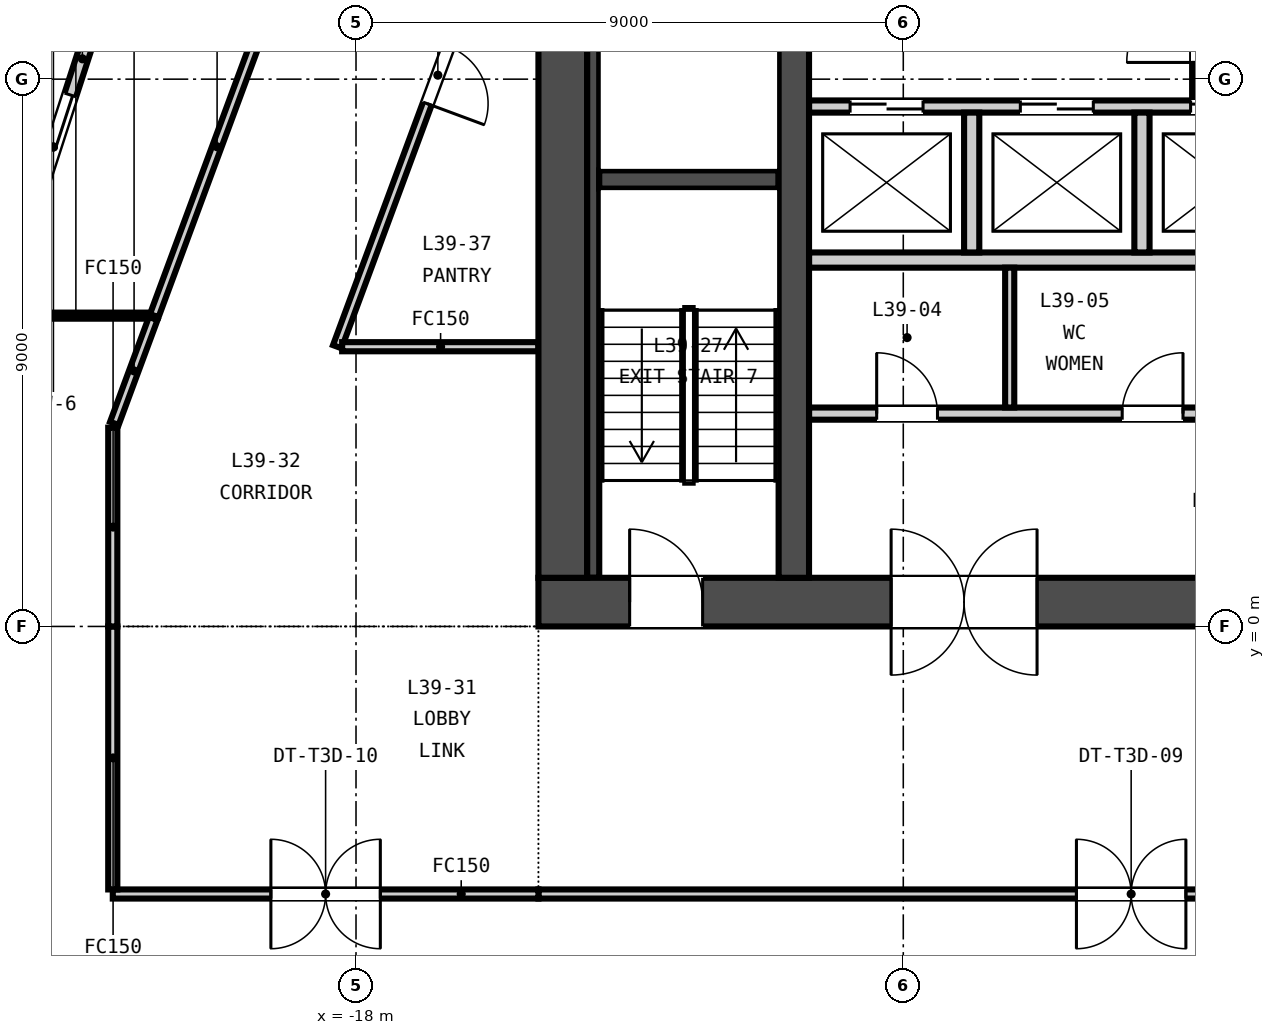
"""IFC4 building model, lengths in metres.
Left out: names, types, materials, properties, quantities, classifications, styles, units other than length and angle.
Written with IfcOpenShell. Run it as: python <this file> out.ifc"""

import sys

from ifc_helpers import new_model, si_unit, direction, frame, frame_2d, origin, place, context, subcontext, project, spatial, rectangle, extrude, element, fill, save


model = new_model("IFC4")
c1 = context("Model", 3, precision=1e-05, world=origin(), true_north=direction((0.0, 1.0)))
c2 = subcontext(c1, "Body", "Model", "MODEL_VIEW")
j1 = project(units=[si_unit("LENGTHUNIT", "METRE"), si_unit("PLANEANGLEUNIT", "RADIAN")], contexts=[c1])
p1 = place(None, origin())
s1 = spatial("IfcSite", under=j1, at=p1, CompositionType="ELEMENT")
p2 = place(p1, origin())
s2 = spatial("IfcBuilding", under=s1, at=p2, CompositionType="ELEMENT")
p3 = place(p2, frame((0.0, 0.0, 159.0)))
s3 = spatial("IfcBuildingStorey", under=s2, at=p3, CompositionType="ELEMENT", Elevation=159.0)
p4 = place(p3, frame((-15.0, 0.4, -0.15), z_axis=(0.0, 0.0, 1.0), x_axis=(1.0, 0.0, 0.0)))
e1 = element("IfcWall", 1, at=p4, inside=s3, PredefinedType="SOLIDWALL", context=c2, shape_type="SweptSolid", body=[
    extrude(rectangle(XDim=30.0, YDim=0.8, at=frame_2d((15.0, 0.0))), origin(), (0.0, 0.0, 1.0), 3.65),
])
p5 = place(p4, frame((5.8, 0.0, 0.15)))
e2 = element("IfcOpeningElement", 2, at=p5, cuts=e1, PredefinedType="OPENING", context=c2, shape_type="SweptSolid", body=[
    extrude(rectangle(XDim=2.4, YDim=2.4, at=frame_2d((1.2, 1.2))), frame((0.0, 0.41, 0.0), z_axis=(0.0, -1.0, 0.0), x_axis=(1.0, 0.0, 0.0)), (0.0, 0.0, 1.0), 0.82),
])
p6 = place(p4, frame((13.8, 0.0, 0.15)))
e3 = element("IfcOpeningElement", 3, at=p6, cuts=e1, PredefinedType="OPENING", context=c2, shape_type="SweptSolid", body=[
    extrude(rectangle(XDim=2.4, YDim=2.4, at=frame_2d((1.2, 1.2))), frame((0.0, 0.41, 0.0), z_axis=(0.0, -1.0, 0.0), x_axis=(1.0, 0.0, 0.0)), (0.0, 0.0, 1.0), 0.82),
])
p7 = place(p4, frame((21.8, 0.0, 0.15)))
e4 = element("IfcOpeningElement", 4, at=p7, cuts=e1, PredefinedType="OPENING", context=c2, shape_type="SweptSolid", body=[
    extrude(rectangle(XDim=2.4, YDim=2.4, at=frame_2d((1.2, 1.2))), frame((0.0, 0.41, 0.0), z_axis=(0.0, -1.0, 0.0), x_axis=(1.0, 0.0, 0.0)), (0.0, 0.0, 1.0), 0.82),
])
p8 = place(p4, frame((1.5, 0.0, 0.15)))
e5 = element("IfcOpeningElement", 5, at=p8, cuts=e1, PredefinedType="OPENING", context=c2, shape_type="SweptSolid", body=[
    extrude(rectangle(XDim=1.2, YDim=2.1, at=frame_2d((0.6, 1.05))), frame((0.0, 0.41, 0.0), z_axis=(0.0, -1.0, 0.0), x_axis=(1.0, 0.0, 0.0)), (0.0, 0.0, 1.0), 0.82),
])
p9 = place(p4, frame((27.3, 0.0, 0.15)))
e6 = element("IfcOpeningElement", 6, at=p9, cuts=e1, PredefinedType="OPENING", context=c2, shape_type="SweptSolid", body=[
    extrude(rectangle(XDim=1.2, YDim=2.1, at=frame_2d((0.6, 1.05))), frame((0.0, 0.41, 0.0), z_axis=(0.0, -1.0, 0.0), x_axis=(1.0, 0.0, 0.0)), (0.0, 0.0, 1.0), 0.82),
])
p10 = place(p3, frame((-14.6, 0.8, -0.15), z_axis=(0.0, 0.0, 1.0), x_axis=(0.0, 1.0, 0.0)))
e7 = element("IfcWall", 7, at=p10, inside=s3, PredefinedType="SOLIDWALL", context=c2, shape_type="SweptSolid", body=[
    extrude(rectangle(XDim=13.4, YDim=0.8, at=frame_2d((6.7, 0.0))), origin(), (0.0, 0.0, 1.0), 3.65),
])
p11 = place(p3, frame((-10.8, 0.8, -0.15), z_axis=(0.0, 0.0, 1.0), x_axis=(0.0, 1.0, 0.0)))
e8 = element("IfcWall", 8, at=p11, inside=s3, PredefinedType="SOLIDWALL", context=c2, shape_type="SweptSolid", body=[
    extrude(rectangle(XDim=13.4, YDim=0.5, at=frame_2d((6.7, 0.0))), origin(), (0.0, 0.0, 1.0), 3.65),
])
p12 = place(p3, frame((-22.327, 9.882, 0.0), z_axis=(0.0, 0.0, 1.0), x_axis=(-0.30901640812, -0.951056706781, 0.0)))
e9 = element("IfcWall", 9, at=p12, inside=s3, PredefinedType="SOLIDWALL", context=c2, shape_type="SweptSolid", body=[
    extrude(rectangle(XDim=4.2, YDim=0.2, at=frame_2d((2.1, 0.0))), origin(), (0.0, 0.0, 1.0), 2.821),
])
p13 = place(p12, frame((1.2, 0.0, 0.0)))
e10 = element("IfcOpeningElement", 10, at=p13, cuts=e9, PredefinedType="OPENING", context=c2, shape_type="SweptSolid", body=[
    extrude(rectangle(XDim=1.8, YDim=2.4, at=frame_2d((0.9, 1.2))), frame((0.0, 0.11, 0.0), z_axis=(0.0, -1.0, 0.0), x_axis=(1.0, 0.0, 0.0)), (0.0, 0.0, 1.0), 0.22),
])
p14 = place(p3, frame((-10.55, 3.5, 0.0), z_axis=(0.0, 0.0, 1.0), x_axis=(1.0, 0.0, 0.0)))
e11 = element("IfcWall", 11, at=p14, inside=s3, PredefinedType="PARTITIONING", context=c2, shape_type="SweptSolid", body=[
    extrude(rectangle(XDim=21.1, YDim=0.2, at=frame_2d((10.55, 0.0))), origin(), (0.0, 0.0, 1.0), 3.5),
])
p15 = place(p14, frame((1.113, 0.0, 0.0)))
e12 = element("IfcOpeningElement", 12, at=p15, cuts=e11, PredefinedType="OPENING", context=c2, shape_type="SweptSolid", body=[
    extrude(rectangle(XDim=1.0, YDim=2.1, at=frame_2d((0.5, 1.05))), frame((0.0, 0.11, 0.0), z_axis=(0.0, -1.0, 0.0), x_axis=(1.0, 0.0, 0.0)), (0.0, 0.0, 1.0), 0.22),
])
p16 = place(p14, frame((5.15, 0.0, 0.0)))
e13 = element("IfcOpeningElement", 13, at=p16, cuts=e11, PredefinedType="OPENING", context=c2, shape_type="SweptSolid", body=[
    extrude(rectangle(XDim=1.0, YDim=2.1, at=frame_2d((0.5, 1.05))), frame((0.0, 0.11, 0.0), z_axis=(0.0, -1.0, 0.0), x_axis=(1.0, 0.0, 0.0)), (0.0, 0.0, 1.0), 0.22),
])
p17 = place(p14, frame((9.85, 0.0, 0.0)))
e14 = element("IfcOpeningElement", 14, at=p17, cuts=e11, PredefinedType="OPENING", context=c2, shape_type="SweptSolid", body=[
    extrude(rectangle(XDim=1.0, YDim=2.1, at=frame_2d((0.5, 1.05))), frame((0.0, 0.11, 0.0), z_axis=(0.0, -1.0, 0.0), x_axis=(1.0, 0.0, 0.0)), (0.0, 0.0, 1.0), 0.22),
])
p18 = place(p14, frame((13.4, 0.0, 0.0)))
e15 = element("IfcOpeningElement", 15, at=p18, cuts=e11, PredefinedType="OPENING", context=c2, shape_type="SweptSolid", body=[
    extrude(rectangle(XDim=1.0, YDim=2.1, at=frame_2d((0.5, 1.05))), frame((0.0, 0.11, 0.0), z_axis=(0.0, -1.0, 0.0), x_axis=(1.0, 0.0, 0.0)), (0.0, 0.0, 1.0), 0.22),
])
p19 = place(p14, frame((16.762, 0.0, 0.0)))
e16 = element("IfcOpeningElement", 16, at=p19, cuts=e11, PredefinedType="OPENING", context=c2, shape_type="SweptSolid", body=[
    extrude(rectangle(XDim=1.0, YDim=2.1, at=frame_2d((0.5, 1.05))), frame((0.0, 0.11, 0.0), z_axis=(0.0, -1.0, 0.0), x_axis=(1.0, 0.0, 0.0)), (0.0, 0.0, 1.0), 0.22),
])
p20 = place(p14, frame((19.9, 0.0, 0.0)))
e17 = element("IfcOpeningElement", 17, at=p20, cuts=e11, PredefinedType="OPENING", context=c2, shape_type="SweptSolid", body=[
    extrude(rectangle(XDim=0.9, YDim=2.1, at=frame_2d((0.45, 1.05))), frame((0.0, 0.11, 0.0), z_axis=(0.0, -1.0, 0.0), x_axis=(1.0, 0.0, 0.0)), (0.0, 0.0, 1.0), 0.22),
])
p21 = place(p3, frame((-10.55, 6.025, 0.0), z_axis=(0.0, 0.0, 1.0), x_axis=(1.0, 0.0, 0.0)))
e18 = element("IfcWall", 18, at=p21, inside=s3, PredefinedType="PARTITIONING", context=c2, shape_type="SweptSolid", body=[
    extrude(rectangle(XDim=21.1, YDim=0.25, at=frame_2d((10.55, 0.0))), origin(), (0.0, 0.0, 1.0), 3.5),
])
p22 = place(p3, frame((-10.55, 8.55, 0.0), z_axis=(0.0, 0.0, 1.0), x_axis=(1.0, 0.0, 0.0)))
e19 = element("IfcWall", 19, at=p22, inside=s3, PredefinedType="PARTITIONING", context=c2, shape_type="SweptSolid", body=[
    extrude(rectangle(XDim=21.1, YDim=0.2, at=frame_2d((10.55, 0.0))), origin(), (0.0, 0.0, 1.0), 3.5),
])
p23 = place(p22, frame((0.675, 0.0, 0.0)))
e20 = element("IfcOpeningElement", 20, at=p23, cuts=e19, PredefinedType="OPENING", context=c2, shape_type="SweptSolid", body=[
    extrude(rectangle(XDim=1.2, YDim=2.1, at=frame_2d((0.6, 1.05))), frame((0.0, 0.11, 0.0), z_axis=(0.0, -1.0, 0.0), x_axis=(1.0, 0.0, 0.0)), (0.0, 0.0, 1.0), 0.22),
])
p24 = place(p22, frame((3.475, 0.0, 0.0)))
e21 = element("IfcOpeningElement", 21, at=p24, cuts=e19, PredefinedType="OPENING", context=c2, shape_type="SweptSolid", body=[
    extrude(rectangle(XDim=1.2, YDim=2.1, at=frame_2d((0.6, 1.05))), frame((0.0, 0.11, 0.0), z_axis=(0.0, -1.0, 0.0), x_axis=(1.0, 0.0, 0.0)), (0.0, 0.0, 1.0), 0.22),
])
p25 = place(p22, frame((6.275, 0.0, 0.0)))
e22 = element("IfcOpeningElement", 22, at=p25, cuts=e19, PredefinedType="OPENING", context=c2, shape_type="SweptSolid", body=[
    extrude(rectangle(XDim=1.2, YDim=2.1, at=frame_2d((0.6, 1.05))), frame((0.0, 0.11, 0.0), z_axis=(0.0, -1.0, 0.0), x_axis=(1.0, 0.0, 0.0)), (0.0, 0.0, 1.0), 0.22),
])
p26 = place(p22, frame((9.075, 0.0, 0.0)))
e23 = element("IfcOpeningElement", 23, at=p26, cuts=e19, PredefinedType="OPENING", context=c2, shape_type="SweptSolid", body=[
    extrude(rectangle(XDim=1.2, YDim=2.1, at=frame_2d((0.6, 1.05))), frame((0.0, 0.11, 0.0), z_axis=(0.0, -1.0, 0.0), x_axis=(1.0, 0.0, 0.0)), (0.0, 0.0, 1.0), 0.22),
])
p27 = place(p22, frame((11.875, 0.0, 0.0)))
e24 = element("IfcOpeningElement", 24, at=p27, cuts=e19, PredefinedType="OPENING", context=c2, shape_type="SweptSolid", body=[
    extrude(rectangle(XDim=1.2, YDim=2.1, at=frame_2d((0.6, 1.05))), frame((0.0, 0.11, 0.0), z_axis=(0.0, -1.0, 0.0), x_axis=(1.0, 0.0, 0.0)), (0.0, 0.0, 1.0), 0.22),
])
p28 = place(p22, frame((14.675, 0.0, 0.0)))
e25 = element("IfcOpeningElement", 25, at=p28, cuts=e19, PredefinedType="OPENING", context=c2, shape_type="SweptSolid", body=[
    extrude(rectangle(XDim=1.2, YDim=2.1, at=frame_2d((0.6, 1.05))), frame((0.0, 0.11, 0.0), z_axis=(0.0, -1.0, 0.0), x_axis=(1.0, 0.0, 0.0)), (0.0, 0.0, 1.0), 0.22),
])
p29 = place(p22, frame((17.475, 0.0, 0.0)))
e26 = element("IfcOpeningElement", 26, at=p29, cuts=e19, PredefinedType="OPENING", context=c2, shape_type="SweptSolid", body=[
    extrude(rectangle(XDim=1.2, YDim=2.1, at=frame_2d((0.6, 1.05))), frame((0.0, 0.11, 0.0), z_axis=(0.0, -1.0, 0.0), x_axis=(1.0, 0.0, 0.0)), (0.0, 0.0, 1.0), 0.22),
])
p30 = place(p22, frame((19.9, 0.0, 0.0)))
e27 = element("IfcOpeningElement", 27, at=p30, cuts=e19, PredefinedType="OPENING", context=c2, shape_type="SweptSolid", body=[
    extrude(rectangle(XDim=0.9, YDim=2.1, at=frame_2d((0.45, 1.05))), frame((0.0, 0.11, 0.0), z_axis=(0.0, -1.0, 0.0), x_axis=(1.0, 0.0, 0.0)), (0.0, 0.0, 1.0), 0.22),
])
p31 = place(p3, frame((-4.125, 8.65, 0.0), z_axis=(0.0, 0.0, 1.0), x_axis=(0.0, 1.0, 0.0)))
e28 = element("IfcWall", 28, at=p31, inside=s3, PredefinedType="PARTITIONING", context=c2, shape_type="SweptSolid", body=[
    extrude(rectangle(XDim=2.45, YDim=0.25, at=frame_2d((1.225, 0.0))), origin(), (0.0, 0.0, 1.0), 3.5),
])
p32 = place(p31, frame((0.625, 0.0, 0.0)))
e29 = element("IfcOpeningElement", 29, at=p32, cuts=e28, PredefinedType="OPENING", context=c2, shape_type="SweptSolid", body=[
    extrude(rectangle(XDim=1.2, YDim=2.1, at=frame_2d((0.6, 1.05))), frame((0.0, 0.135, 0.0), z_axis=(0.0, -1.0, 0.0), x_axis=(1.0, 0.0, 0.0)), (0.0, 0.0, 1.0), 0.27),
])
p33 = place(p3, frame((-7.25, 3.6, 0.0), z_axis=(0.0, 0.0, 1.0), x_axis=(0.0, 1.0, 0.0)))
e30 = element("IfcWall", 30, at=p33, inside=s3, PredefinedType="PARTITIONING", context=c2, shape_type="SweptSolid", body=[
    extrude(rectangle(XDim=2.3, YDim=0.15, at=frame_2d((1.15, 0.0))), origin(), (0.0, 0.0, 1.0), 3.5),
])
for number, where, z_axis, x_axis in (
    (31, (-7.875, 6.15, 0.0), (0.0, 0.0, 1.0), (0.0, 1.0, 0.0)),
    (32, (-5.075, 6.15, 0.0), (0.0, 0.0, 1.0), (0.0, 1.0, 0.0)),
):
    element("IfcWall", number, at=place(p3, frame(where, z_axis=z_axis, x_axis=x_axis)), inside=s3, PredefinedType="PARTITIONING", context=c2, shape_type="SweptSolid", body=[
        extrude(rectangle(XDim=2.3, YDim=0.25, at=frame_2d((1.15, 0.0))), origin(), (0.0, 0.0, 1.0), 3.5),
    ])
p34 = place(p3, frame((-14.0, 7.35, 0.0), z_axis=(0.0, 0.0, 1.0), x_axis=(1.0, 0.0, 0.0)))
e33 = element("IfcWall", 33, at=p34, inside=s3, PredefinedType="SOLIDWALL", context=c2, shape_type="SweptSolid", body=[
    extrude(rectangle(XDim=2.95, YDim=0.3, at=frame_2d((1.475, 0.0))), origin(), (0.0, 0.0, 1.0), 3.5),
])
p35 = place(p3, frame((-14.1, 0.8, 0.0), z_axis=(0.0, 0.0, 1.0), x_axis=(0.0, 1.0, 0.0)))
e34 = element("IfcWall", 34, at=p35, inside=s3, PredefinedType="SOLIDWALL", context=c2, shape_type="SweptSolid", body=[
    extrude(rectangle(XDim=13.4, YDim=0.2, at=frame_2d((6.7, 0.0))), origin(), (0.0, 0.0, 1.0), 3.5),
])
p36 = place(p3, frame((4.495, -4.4, 0.0), z_axis=(0.0, 0.0, 1.0), x_axis=(-1.0, 0.0, 0.0)))
e35 = element("IfcWall", 35, at=p36, inside=s3, PredefinedType="PARTITIONING", context=c2, shape_type="SweptSolid", body=[
    extrude(rectangle(XDim=19.495, YDim=0.15, at=frame_2d((9.748, 0.0))), origin(), (0.0, 0.0, 1.0), 2.741),
])
p37 = place(p36, frame((8.847, 0.0, 0.0)))
e36 = element("IfcOpeningElement", 36, at=p37, cuts=e35, PredefinedType="OPENING", context=c2, shape_type="SweptSolid", body=[
    extrude(rectangle(XDim=1.8, YDim=2.1, at=frame_2d((0.9, 1.05))), frame((0.0, 0.085, 0.0), z_axis=(0.0, -1.0, 0.0), x_axis=(1.0, 0.0, 0.0)), (0.0, 0.0, 1.0), 0.17),
])
p38 = place(p3, frame((-15.0, -4.4, 0.0), z_axis=(0.0, 0.0, 1.0), x_axis=(-1.0, 0.0, 0.0)))
e37 = element("IfcWall", 37, at=p38, inside=s3, PredefinedType="PARTITIONING", context=c2, shape_type="SweptSolid", body=[
    extrude(rectangle(XDim=7.0, YDim=0.15, at=frame_2d((3.5, 0.0))), origin(), (0.0, 0.0, 1.0), 2.741),
])
p39 = place(p38, frame((2.6, 0.0, 0.0)))
e38 = element("IfcOpeningElement", 38, at=p39, cuts=e37, PredefinedType="OPENING", context=c2, shape_type="SweptSolid", body=[
    extrude(rectangle(XDim=1.8, YDim=2.1, at=frame_2d((0.9, 1.05))), frame((0.0, 0.085, 0.0), z_axis=(0.0, -1.0, 0.0), x_axis=(1.0, 0.0, 0.0)), (0.0, 0.0, 1.0), 0.17),
])
p40 = place(p3, frame((-15.0, 13.531, 0.0), z_axis=(0.0, 0.0, 1.0), x_axis=(-0.347347751601, -0.937736391241, 0.0)))
e39 = element("IfcWall", 39, at=p40, inside=s3, PredefinedType="PARTITIONING", context=c2, shape_type="SweptSolid", body=[
    extrude(rectangle(XDim=9.524, YDim=0.15, at=frame_2d((4.762, 0.0))), origin(), (0.0, 0.0, 1.0), 2.741),
])
p41 = place(p40, frame((4.262, 0.0, 0.0)))
e40 = element("IfcOpeningElement", 40, at=p41, cuts=e39, PredefinedType="OPENING", context=c2, shape_type="SweptSolid", body=[
    extrude(rectangle(XDim=1.0, YDim=2.1, at=frame_2d((0.5, 1.05))), frame((0.0, 0.085, 0.0), z_axis=(0.0, -1.0, 0.0), x_axis=(1.0, 0.0, 0.0)), (0.0, 0.0, 1.0), 0.17),
])
p42 = place(p3, frame((-21.318, 5.111, 0.0), z_axis=(0.0, 0.0, 1.0), x_axis=(0.347346173898, 0.937736975638, 0.0)))
e41 = element("IfcWall", 41, at=p42, inside=s3, PredefinedType="PARTITIONING", context=c2, shape_type="SweptSolid", body=[
    extrude(rectangle(XDim=13.745, YDim=0.15, at=frame_2d((6.872, 0.0))), origin(), (0.0, 0.0, 1.0), 2.741),
])
p43 = place(p42, frame((5.972, 0.0, 0.0)))
e42 = element("IfcOpeningElement", 42, at=p43, cuts=e41, PredefinedType="OPENING", context=c2, shape_type="SweptSolid", body=[
    extrude(rectangle(XDim=1.8, YDim=2.1, at=frame_2d((0.9, 1.05))), frame((0.0, 0.085, 0.0), z_axis=(0.0, -1.0, 0.0), x_axis=(1.0, 0.0, 0.0)), (0.0, 0.0, 1.0), 0.17),
])
p44 = place(p3, frame((-23.831, 5.111, 0.0), z_axis=(0.0, 0.0, 1.0), x_axis=(1.0, 0.0, 0.0)))
e43 = element("IfcWall", 43, at=p44, inside=s3, PredefinedType="PARTITIONING", context=c2, shape_type="SweptSolid", body=[
    extrude(rectangle(XDim=2.438, YDim=0.1, at=frame_2d((1.219, 0.0))), origin(), (0.0, 0.0, 1.0), 2.741),
])
p45 = place(p3, frame((-18.228, 4.6, 0.0), z_axis=(0.0, 0.0, 1.0), x_axis=(1.0, 0.0, 0.0)))
e44 = element("IfcWall", 44, at=p45, inside=s3, PredefinedType="PARTITIONING", context=c2, shape_type="SweptSolid", body=[
    extrude(rectangle(XDim=3.228, YDim=0.15, at=frame_2d((1.614, 0.0))), origin(), (0.0, 0.0, 1.0), 2.741),
])
p46 = place(p3, frame((-22.0, -4.325, 0.0), z_axis=(0.0, 0.0, 1.0), x_axis=(0.0, 1.0, 0.0)))
e45 = element("IfcWall", 45, at=p46, inside=s3, PredefinedType="PARTITIONING", context=c2, shape_type="SweptSolid", body=[
    extrude(rectangle(XDim=4.325, YDim=0.15, at=frame_2d((2.163, 0.0))), origin(), (0.0, 0.0, 1.0), 2.741),
])
p47 = place(p3, frame((-22.0, 0.0, 0.0), z_axis=(0.0, 0.0, 1.0), x_axis=(0.0, 1.0, 0.0)))
e46 = element("IfcWall", 46, at=p47, inside=s3, PredefinedType="PARTITIONING", context=c2, shape_type="SweptSolid", body=[
    extrude(rectangle(XDim=3.269, YDim=0.15, at=frame_2d((1.635, 0.0))), origin(), (0.0, 0.0, 1.0), 2.741),
])
p48 = place(p3, frame((-21.974, 3.339, 0.0), z_axis=(0.0, 0.0, 1.0), x_axis=(0.347236538536, 0.93777757827, 0.0)))
e47 = element("IfcWall", 47, at=p48, inside=s3, PredefinedType="PARTITIONING", context=c2, shape_type="SweptSolid", body=[
    extrude(rectangle(XDim=1.839, YDim=0.15, at=frame_2d((0.92, 0.0))), origin(), (0.0, 0.0, 1.0), 2.741),
])
p49 = place(p13, origin())
e48 = element("IfcDoor", 48, at=p49, inside=s3, OperationType="SINGLE_SWING_LEFT", PredefinedType="DOOR", context=c2, shape_type="SweptSolid", body=[
    extrude(rectangle(XDim=1.8, YDim=2.4, at=frame_2d((0.9, 1.2))), frame((0.0, 0.025, 0.0), z_axis=(0.0, -1.0, 0.0), x_axis=(1.0, 0.0, 0.0)), (0.0, 0.0, 1.0), 0.05),
])
fill(e10, e48)
p50 = place(p15, origin())
e49 = element("IfcDoor", 49, at=p50, inside=s3, OperationType="SINGLE_SWING_LEFT", PredefinedType="DOOR", context=c2, shape_type="SweptSolid", body=[
    extrude(rectangle(XDim=1.0, YDim=2.1, at=frame_2d((0.5, 1.05))), frame((0.0, 0.025, 0.0), z_axis=(0.0, -1.0, 0.0), x_axis=(1.0, 0.0, 0.0)), (0.0, 0.0, 1.0), 0.05),
])
fill(e12, e49)
p51 = place(p16, origin())
e50 = element("IfcDoor", 50, at=p51, inside=s3, OperationType="SINGLE_SWING_RIGHT", PredefinedType="DOOR", context=c2, shape_type="SweptSolid", body=[
    extrude(rectangle(XDim=1.0, YDim=2.1, at=frame_2d((0.5, 1.05))), frame((0.0, 0.025, 0.0), z_axis=(0.0, -1.0, 0.0), x_axis=(1.0, 0.0, 0.0)), (0.0, 0.0, 1.0), 0.05),
])
fill(e13, e50)
p52 = place(p23, origin())
e51 = element("IfcDoor", 51, at=p52, inside=s3, OperationType="DOUBLE_DOOR_SLIDING", PredefinedType="DOOR", context=c2, shape_type="SweptSolid", body=[
    extrude(rectangle(XDim=1.2, YDim=2.1, at=frame_2d((0.6, 1.05))), frame((0.0, 0.025, 0.0), z_axis=(0.0, -1.0, 0.0), x_axis=(1.0, 0.0, 0.0)), (0.0, 0.0, 1.0), 0.05),
])
fill(e20, e51)
p53 = place(p24, origin())
e52 = element("IfcDoor", 52, at=p53, inside=s3, OperationType="DOUBLE_DOOR_SLIDING", PredefinedType="DOOR", context=c2, shape_type="SweptSolid", body=[
    extrude(rectangle(XDim=1.2, YDim=2.1, at=frame_2d((0.6, 1.05))), frame((0.0, 0.025, 0.0), z_axis=(0.0, -1.0, 0.0), x_axis=(1.0, 0.0, 0.0)), (0.0, 0.0, 1.0), 0.05),
])
fill(e21, e52)
p54 = place(p25, origin())
e53 = element("IfcDoor", 53, at=p54, inside=s3, OperationType="DOUBLE_DOOR_SLIDING", PredefinedType="DOOR", context=c2, shape_type="SweptSolid", body=[
    extrude(rectangle(XDim=1.2, YDim=2.1, at=frame_2d((0.6, 1.05))), frame((0.0, 0.025, 0.0), z_axis=(0.0, -1.0, 0.0), x_axis=(1.0, 0.0, 0.0)), (0.0, 0.0, 1.0), 0.05),
])
fill(e22, e53)
p55 = place(p5, origin())
e54 = element("IfcDoor", 54, at=p55, inside=s3, OperationType="DOUBLE_DOOR_DOUBLE_SWING", PredefinedType="DOOR", context=c2, shape_type="SweptSolid", body=[
    extrude(rectangle(XDim=2.4, YDim=2.4, at=frame_2d((1.2, 1.2))), frame((0.0, 0.025, 0.0), z_axis=(0.0, -1.0, 0.0), x_axis=(1.0, 0.0, 0.0)), (0.0, 0.0, 1.0), 0.05),
])
fill(e2, e54)
p56 = place(p8, origin())
e55 = element("IfcDoor", 55, at=p56, inside=s3, OperationType="SINGLE_SWING_LEFT", PredefinedType="DOOR", context=c2, shape_type="SweptSolid", body=[
    extrude(rectangle(XDim=1.2, YDim=2.1, at=frame_2d((0.6, 1.05))), frame((0.0, 0.025, 0.0), z_axis=(0.0, -1.0, 0.0), x_axis=(1.0, 0.0, 0.0)), (0.0, 0.0, 1.0), 0.05),
])
fill(e5, e55)
p57 = place(p41, origin())
e56 = element("IfcDoor", 56, at=p57, inside=s3, OperationType="SINGLE_SWING_RIGHT", PredefinedType="DOOR", context=c2, shape_type="SweptSolid", body=[
    extrude(rectangle(XDim=1.0, YDim=2.1, at=frame_2d((0.5, 1.05))), frame((0.0, 0.025, 0.0), z_axis=(0.0, -1.0, 0.0), x_axis=(1.0, 0.0, 0.0)), (0.0, 0.0, 1.0), 0.05),
])
fill(e40, e56)
p58 = place(p37, origin())
e57 = element("IfcDoor", 57, at=p58, inside=s3, OperationType="DOUBLE_DOOR_DOUBLE_SWING", PredefinedType="DOOR", context=c2, shape_type="SweptSolid", body=[
    extrude(rectangle(XDim=1.8, YDim=2.1, at=frame_2d((0.9, 1.05))), frame((0.0, 0.025, 0.0), z_axis=(0.0, -1.0, 0.0), x_axis=(1.0, 0.0, 0.0)), (0.0, 0.0, 1.0), 0.05),
])
fill(e36, e57)
p59 = place(p39, origin())
e58 = element("IfcDoor", 58, at=p59, inside=s3, OperationType="DOUBLE_DOOR_DOUBLE_SWING", PredefinedType="DOOR", context=c2, shape_type="SweptSolid", body=[
    extrude(rectangle(XDim=1.8, YDim=2.1, at=frame_2d((0.9, 1.05))), frame((0.0, 0.025, 0.0), z_axis=(0.0, -1.0, 0.0), x_axis=(1.0, 0.0, 0.0)), (0.0, 0.0, 1.0), 0.05),
])
fill(e38, e58)
save(model, sys.argv[1])
